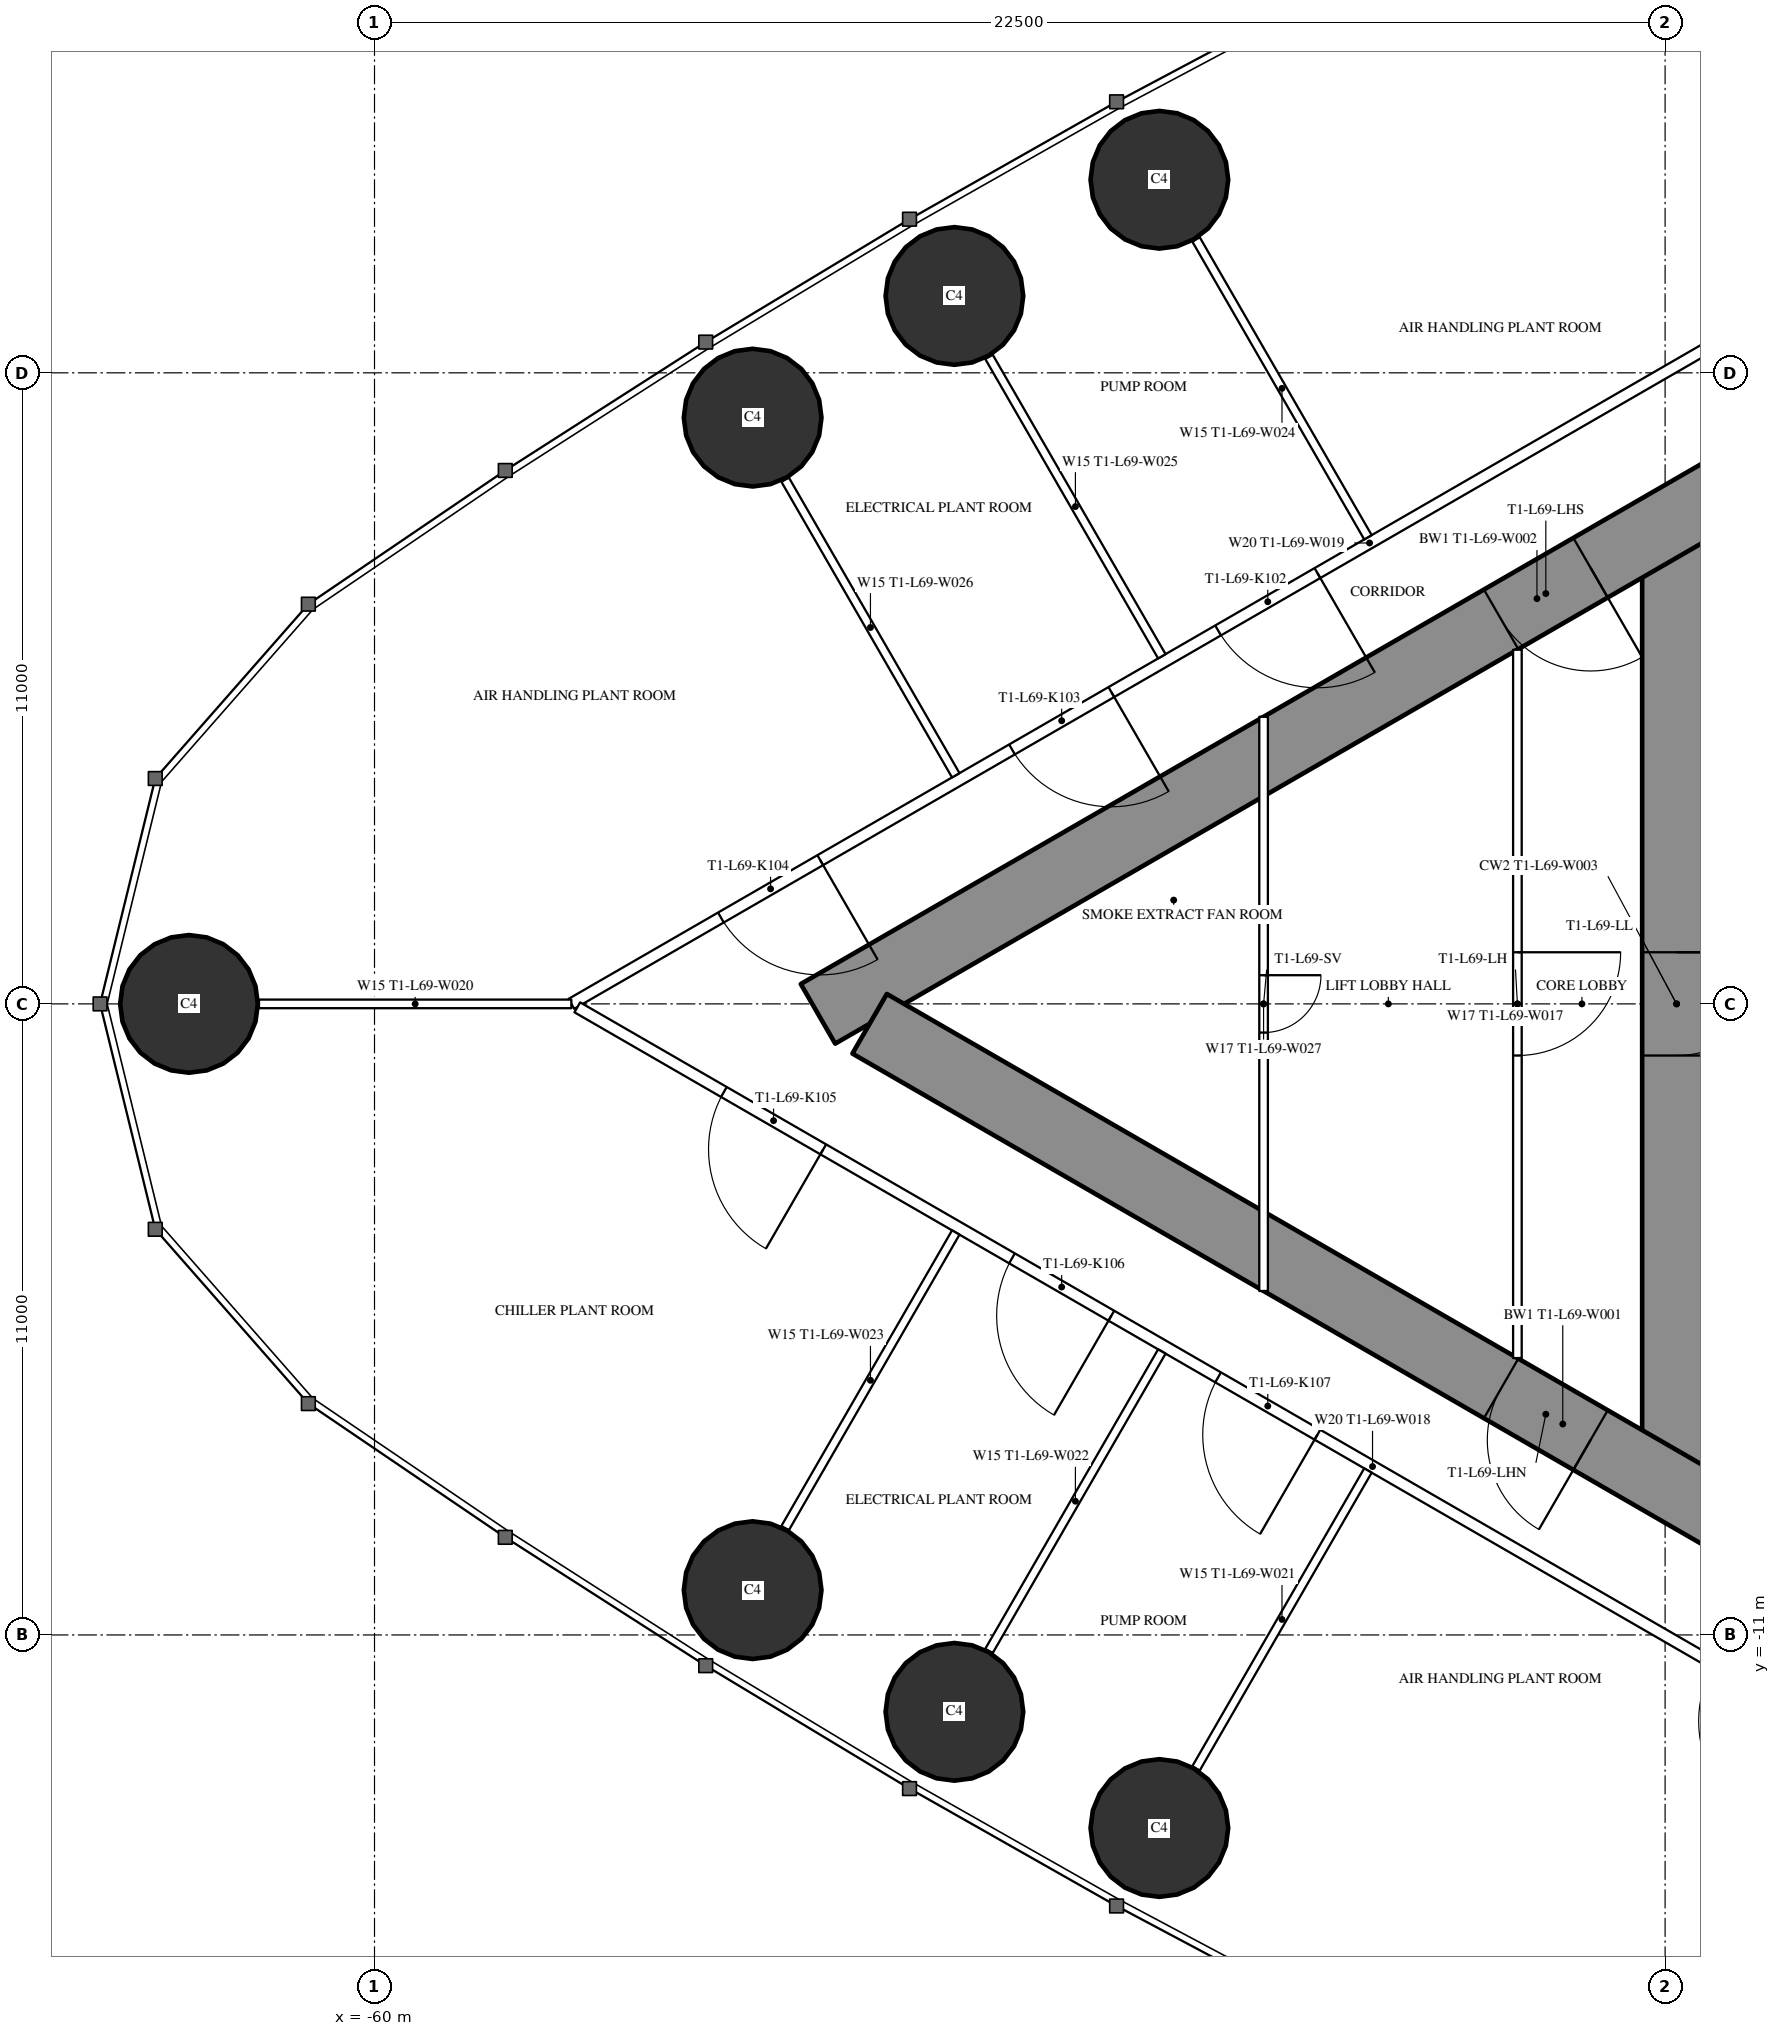
"""IFC4 building model, lengths in metres.
Left out: names, types, materials, properties, quantities, classifications, styles, units other than length and angle.
Written with IfcOpenShell. Run it as: python <this file> out.ifc"""

import sys

from ifc_helpers import new_model, si_unit, direction, frame, frame_2d, origin, origin_2d, place, context, subcontext, project, spatial, rectangle, circle, extrude, element, fill, save


model = new_model("IFC4")
c1 = context("Model", 3, precision=1e-05, world=origin(), true_north=direction((0.0, 1.0)))
c2 = subcontext(c1, "Body", "Model", "MODEL_VIEW")
j1 = project(units=[si_unit("LENGTHUNIT", "METRE"), si_unit("PLANEANGLEUNIT", "RADIAN")], contexts=[c1])
p1 = place(None, origin())
s1 = spatial("IfcSite", under=j1, at=p1, CompositionType="ELEMENT")
p2 = place(p1, origin())
s2 = spatial("IfcBuilding", under=s1, at=p2, CompositionType="ELEMENT")
p3 = place(p2, frame((0.0, 0.0, 263.3)))
s3 = spatial("IfcBuildingStorey", under=s2, at=p3, CompositionType="ELEMENT", Elevation=263.3)
for number, where, z_axis, x_axis in (
    (1, (-63.234, 0.0, 0.0), (0.0, 0.0, 1.0), (1.0, 0.0, 0.0)),
    (2, (-53.408, -10.219, 0.0), (0.0, 0.0, 1.0), (1.0, 0.0, 0.0)),
    (3, (-49.89, -12.34, 0.0), (0.0, 0.0, 1.0), (1.0, 0.0, 0.0)),
    (4, (-46.317, -14.365, 0.0), (0.0, 0.0, 1.0), (1.0, 0.0, 0.0)),
    (5, (-46.317, 14.365, 0.0), (0.0, 0.0, 1.0), (1.0, 0.0, 0.0)),
    (6, (-49.89, 12.34, 0.0), (0.0, 0.0, 1.0), (1.0, 0.0, 0.0)),
    (7, (-53.408, 10.219, 0.0), (0.0, 0.0, 1.0), (1.0, 0.0, 0.0)),
):
    element("IfcColumn", number, at=place(p3, frame(where, z_axis=z_axis, x_axis=x_axis)), inside=s3, PredefinedType="COLUMN", context=c2, shape_type="SweptSolid", body=[
        extrude(circle(Radius=1.2, at=origin_2d()), origin(), (0.0, 0.0, 1.0), 5.0),
    ])
p4 = place(p3, frame((-37.3, 8.6, 0.0), z_axis=(0.0, 0.0, 1.0), x_axis=(0.0, -1.0, 0.0)))
e8 = element("IfcWall", 8, at=p4, inside=s3, PredefinedType="SHEAR", context=c2, shape_type="SweptSolid", body=[
    extrude(rectangle(XDim=17.2, YDim=1.2, at=frame_2d((8.6, 0.0))), origin(), (0.0, 0.0, 1.0), 5.0),
])
p5 = place(p4, frame((7.7, 0.0, 0.0)))
e9 = element("IfcOpeningElement", 9, at=p5, cuts=e8, PredefinedType="OPENING", context=c2, shape_type="SweptSolid", body=[
    extrude(rectangle(XDim=1.8, YDim=2.2, at=frame_2d((0.9, 1.1))), frame((0.0, 0.61, 0.0), z_axis=(0.0, -1.0, 0.0), x_axis=(1.0, 0.0, 0.0)), (0.0, 0.0, 1.0), 1.22),
])
p6 = place(p3, frame((-27.2, 14.3, 0.0), z_axis=(0.0, 0.0, 1.0), x_axis=(-0.866026593062, -0.499997940104, 0.0)))
e10 = element("IfcWall", 10, at=p6, inside=s3, PredefinedType="SHEAR", context=c2, shape_type="SweptSolid", body=[
    extrude(rectangle(XDim=28.946, YDim=1.2, at=frame_2d((14.473, 0.0))), origin(), (0.0, 0.0, 1.0), 5.0),
])
p7 = place(p6, frame((4.6, 0.0, 0.0)))
e11 = element("IfcOpeningElement", 11, at=p7, cuts=e10, PredefinedType="OPENING", context=c2, shape_type="SweptSolid", body=[
    extrude(rectangle(XDim=1.0, YDim=2.2, at=frame_2d((0.5, 1.1))), frame((0.0, 0.61, 0.0), z_axis=(0.0, -1.0, 0.0), x_axis=(1.0, 0.0, 0.0)), (0.0, 0.0, 1.0), 1.22),
])
p8 = place(p6, frame((13.395, 0.0, 0.0)))
e12 = element("IfcOpeningElement", 12, at=p8, cuts=e10, PredefinedType="OPENING", context=c2, shape_type="SweptSolid", body=[
    extrude(rectangle(XDim=1.8, YDim=2.2, at=frame_2d((0.9, 1.1))), frame((0.0, 0.61, 0.0), z_axis=(0.0, -1.0, 0.0), x_axis=(1.0, 0.0, 0.0)), (0.0, 0.0, 1.0), 1.22),
])
p9 = place(p3, frame((-27.2, -14.3, 0.0), z_axis=(0.0, 0.0, 1.0), x_axis=(-0.866024021859, 0.500002393557, 0.0)))
e13 = element("IfcWall", 13, at=p9, inside=s3, PredefinedType="SHEAR", context=c2, shape_type="SweptSolid", body=[
    extrude(rectangle(XDim=27.907, YDim=1.2, at=frame_2d((13.954, 0.0))), origin(), (0.0, 0.0, 1.0), 5.0),
])
p10 = place(p9, frame((4.6, 0.0, 0.0)))
e14 = element("IfcOpeningElement", 14, at=p10, cuts=e13, PredefinedType="OPENING", context=c2, shape_type="SweptSolid", body=[
    extrude(rectangle(XDim=1.0, YDim=2.2, at=frame_2d((0.5, 1.1))), frame((0.0, 0.61, 0.0), z_axis=(0.0, -1.0, 0.0), x_axis=(1.0, 0.0, 0.0)), (0.0, 0.0, 1.0), 1.22),
])
p11 = place(p9, frame((13.395, 0.0, 0.0)))
e15 = element("IfcOpeningElement", 15, at=p11, cuts=e13, PredefinedType="OPENING", context=c2, shape_type="SweptSolid", body=[
    extrude(rectangle(XDim=1.8, YDim=2.2, at=frame_2d((0.9, 1.1))), frame((0.0, 0.61, 0.0), z_axis=(0.0, -1.0, 0.0), x_axis=(1.0, 0.0, 0.0)), (0.0, 0.0, 1.0), 1.22),
])
p12 = place(p3, frame((-28.737, 16.068, 0.0), z_axis=(0.0, 0.0, 1.0), x_axis=(-0.866026057212, -0.499998868229, 0.0)))
e16 = element("IfcWall", 16, at=p12, inside=s3, PredefinedType="PARTITIONING", context=c2, shape_type="SweptSolid", body=[
    extrude(rectangle(XDim=32.137, YDim=0.2, at=frame_2d((16.068, 0.0))), origin(), (0.0, 0.0, 1.0), 4.75),
])
p13 = place(p12, frame((7.134, 0.0, 0.0)))
e17 = element("IfcOpeningElement", 17, at=p13, cuts=e16, PredefinedType="OPENING", context=c2, shape_type="SweptSolid", body=[
    extrude(rectangle(XDim=2.0, YDim=2.4, at=frame_2d((1.0, 1.2))), frame((0.0, 0.11, 0.0), z_axis=(0.0, -1.0, 0.0), x_axis=(1.0, 0.0, 0.0)), (0.0, 0.0, 1.0), 0.22),
])
p14 = place(p12, frame((17.117, 0.0, 0.0)))
e18 = element("IfcOpeningElement", 18, at=p14, cuts=e16, PredefinedType="OPENING", context=c2, shape_type="SweptSolid", body=[
    extrude(rectangle(XDim=2.0, YDim=2.4, at=frame_2d((1.0, 1.2))), frame((0.0, 0.11, 0.0), z_axis=(0.0, -1.0, 0.0), x_axis=(1.0, 0.0, 0.0)), (0.0, 0.0, 1.0), 0.22),
])
p15 = place(p12, frame((21.266, 0.0, 0.0)))
e19 = element("IfcOpeningElement", 19, at=p15, cuts=e16, PredefinedType="OPENING", context=c2, shape_type="SweptSolid", body=[
    extrude(rectangle(XDim=2.0, YDim=2.4, at=frame_2d((1.0, 1.2))), frame((0.0, 0.11, 0.0), z_axis=(0.0, -1.0, 0.0), x_axis=(1.0, 0.0, 0.0)), (0.0, 0.0, 1.0), 0.22),
])
p16 = place(p12, frame((27.126, 0.0, 0.0)))
e20 = element("IfcOpeningElement", 20, at=p16, cuts=e16, PredefinedType="OPENING", context=c2, shape_type="SweptSolid", body=[
    extrude(rectangle(XDim=2.0, YDim=2.4, at=frame_2d((1.0, 1.2))), frame((0.0, 0.11, 0.0), z_axis=(0.0, -1.0, 0.0), x_axis=(1.0, 0.0, 0.0)), (0.0, 0.0, 1.0), 0.22),
])
p17 = place(p3, frame((-28.737, -16.068, 0.0), z_axis=(0.0, 0.0, 1.0), x_axis=(-0.866026220747, 0.499998584977, 0.0)))
e21 = element("IfcWall", 21, at=p17, inside=s3, PredefinedType="PARTITIONING", context=c2, shape_type="SweptSolid", body=[
    extrude(rectangle(XDim=32.017, YDim=0.2, at=frame_2d((16.008, 0.0))), origin(), (0.0, 0.0, 1.0), 4.75),
])
p18 = place(p17, frame((27.066, 0.0, 0.0)))
e22 = element("IfcOpeningElement", 22, at=p18, cuts=e21, PredefinedType="OPENING", context=c2, shape_type="SweptSolid", body=[
    extrude(rectangle(XDim=2.0, YDim=2.4, at=frame_2d((1.0, 1.2))), frame((0.0, 0.11, 0.0), z_axis=(0.0, -1.0, 0.0), x_axis=(1.0, 0.0, 0.0)), (0.0, 0.0, 1.0), 0.22),
])
p19 = place(p17, frame((21.266, 0.0, 0.0)))
e23 = element("IfcOpeningElement", 23, at=p19, cuts=e21, PredefinedType="OPENING", context=c2, shape_type="SweptSolid", body=[
    extrude(rectangle(XDim=2.0, YDim=2.4, at=frame_2d((1.0, 1.2))), frame((0.0, 0.11, 0.0), z_axis=(0.0, -1.0, 0.0), x_axis=(1.0, 0.0, 0.0)), (0.0, 0.0, 1.0), 0.22),
])
p20 = place(p17, frame((17.117, 0.0, 0.0)))
e24 = element("IfcOpeningElement", 24, at=p20, cuts=e21, PredefinedType="OPENING", context=c2, shape_type="SweptSolid", body=[
    extrude(rectangle(XDim=2.0, YDim=2.4, at=frame_2d((1.0, 1.2))), frame((0.0, 0.11, 0.0), z_axis=(0.0, -1.0, 0.0), x_axis=(1.0, 0.0, 0.0)), (0.0, 0.0, 1.0), 0.22),
])
p21 = place(p17, frame((7.134, 0.0, 0.0)))
e25 = element("IfcOpeningElement", 25, at=p21, cuts=e21, PredefinedType="OPENING", context=c2, shape_type="SweptSolid", body=[
    extrude(rectangle(XDim=2.0, YDim=2.4, at=frame_2d((1.0, 1.2))), frame((0.0, 0.11, 0.0), z_axis=(0.0, -1.0, 0.0), x_axis=(1.0, 0.0, 0.0)), (0.0, 0.0, 1.0), 0.22),
])
p22 = place(p3, frame((-42.68, 8.134, 0.0), z_axis=(0.0, 0.0, 1.0), x_axis=(-0.499984479505, 0.866034364361, 0.0)))
e26 = element("IfcWall", 26, at=p22, inside=s3, PredefinedType="PARTITIONING", context=c2, shape_type="SweptSolid", body=[
    extrude(rectangle(XDim=5.995, YDim=0.15, at=frame_2d((2.998, 0.0))), origin(), (0.0, 0.0, 1.0), 3.85),
])
p23 = place(p3, frame((-46.274, 6.059, 0.0), z_axis=(0.0, 0.0, 1.0), x_axis=(-0.500020471368, 0.866013584312, 0.0)))
e27 = element("IfcWall", 27, at=p23, inside=s3, PredefinedType="PARTITIONING", context=c2, shape_type="SweptSolid", body=[
    extrude(rectangle(XDim=6.028, YDim=0.15, at=frame_2d((3.014, 0.0))), origin(), (0.0, 0.0, 1.0), 3.85),
])
p24 = place(p3, frame((-49.866, 3.985, 0.0), z_axis=(0.0, 0.0, 1.0), x_axis=(-0.500000694566, 0.866025002776, 0.0)))
e28 = element("IfcWall", 28, at=p24, inside=s3, PredefinedType="PARTITIONING", context=c2, shape_type="SweptSolid", body=[
    extrude(rectangle(XDim=5.95, YDim=0.15, at=frame_2d((2.975, 0.0))), origin(), (0.0, 0.0, 1.0), 3.85),
])
p25 = place(p3, frame((-42.68, -8.134, 0.0), z_axis=(0.0, 0.0, 1.0), x_axis=(-0.499984479505, -0.866034364361, 0.0)))
e29 = element("IfcWall", 29, at=p25, inside=s3, PredefinedType="PARTITIONING", context=c2, shape_type="SweptSolid", body=[
    extrude(rectangle(XDim=5.995, YDim=0.15, at=frame_2d((2.998, 0.0))), origin(), (0.0, 0.0, 1.0), 3.85),
])
p26 = place(p3, frame((-46.274, -6.059, 0.0), z_axis=(0.0, 0.0, 1.0), x_axis=(-0.500020471368, -0.866013584312, 0.0)))
e30 = element("IfcWall", 30, at=p26, inside=s3, PredefinedType="PARTITIONING", context=c2, shape_type="SweptSolid", body=[
    extrude(rectangle(XDim=6.028, YDim=0.15, at=frame_2d((3.014, 0.0))), origin(), (0.0, 0.0, 1.0), 3.85),
])
p27 = place(p3, frame((-49.866, -3.985, 0.0), z_axis=(0.0, 0.0, 1.0), x_axis=(-0.500000694566, -0.866025002776, 0.0)))
e31 = element("IfcWall", 31, at=p27, inside=s3, PredefinedType="PARTITIONING", context=c2, shape_type="SweptSolid", body=[
    extrude(rectangle(XDim=5.95, YDim=0.15, at=frame_2d((2.975, 0.0))), origin(), (0.0, 0.0, 1.0), 3.85),
])
p28 = place(p3, frame((-56.568, 0.0, 0.0), z_axis=(0.0, 0.0, 1.0), x_axis=(-1.0, 0.0, 0.0)))
e32 = element("IfcWall", 32, at=p28, inside=s3, PredefinedType="PARTITIONING", context=c2, shape_type="SweptSolid", body=[
    extrude(rectangle(XDim=5.446, YDim=0.15, at=frame_2d((2.723, 0.0))), origin(), (0.0, 0.0, 1.0), 3.85),
])
p29 = place(p3, frame((-40.075, 6.174, 0.0), z_axis=(0.0, 0.0, 1.0), x_axis=(0.0, -1.0, 0.0)))
e33 = element("IfcWall", 33, at=p29, inside=s3, PredefinedType="PARTITIONING", context=c2, shape_type="SweptSolid", body=[
    extrude(rectangle(XDim=12.348, YDim=0.15, at=frame_2d((6.174, 0.0))), origin(), (0.0, 0.0, 1.0), 4.75),
])
p30 = place(p29, frame((5.274, 0.0, 0.0)))
e34 = element("IfcOpeningElement", 34, at=p30, cuts=e33, PredefinedType="OPENING", context=c2, shape_type="SweptSolid", body=[
    extrude(rectangle(XDim=1.8, YDim=2.2, at=frame_2d((0.9, 1.1))), frame((0.0, 0.085, 0.0), z_axis=(0.0, -1.0, 0.0), x_axis=(1.0, 0.0, 0.0)), (0.0, 0.0, 1.0), 0.17),
])
p31 = place(p3, frame((-44.5, 5.005, 0.0), z_axis=(0.0, 0.0, 1.0), x_axis=(0.0, -1.0, 0.0)))
e35 = element("IfcWall", 35, at=p31, inside=s3, PredefinedType="PARTITIONING", context=c2, shape_type="SweptSolid", body=[
    extrude(rectangle(XDim=10.009, YDim=0.15, at=frame_2d((5.005, 0.0))), origin(), (0.0, 0.0, 1.0), 3.9),
])
p32 = place(p31, frame((4.505, 0.0, 0.0)))
e36 = element("IfcOpeningElement", 36, at=p32, cuts=e35, PredefinedType="OPENING", context=c2, shape_type="SweptSolid", body=[
    extrude(rectangle(XDim=1.0, YDim=2.2, at=frame_2d((0.5, 1.1))), frame((0.0, 0.085, 0.0), z_axis=(0.0, -1.0, 0.0), x_axis=(1.0, 0.0, 0.0)), (0.0, 0.0, 1.0), 0.17),
])
p33 = place(p14, origin())
e37 = element("IfcDoor", 37, at=p33, inside=s3, OperationType="DOUBLE_DOOR_SINGLE_SWING", PredefinedType="DOOR", context=c2, shape_type="SweptSolid", body=[
    extrude(rectangle(XDim=2.0, YDim=2.4, at=frame_2d((1.0, 1.2))), frame((0.0, 0.025, 0.0), z_axis=(0.0, -1.0, 0.0), x_axis=(1.0, 0.0, 0.0)), (0.0, 0.0, 1.0), 0.05),
])
fill(e18, e37)
p34 = place(p15, origin())
e38 = element("IfcDoor", 38, at=p34, inside=s3, OperationType="DOUBLE_DOOR_SINGLE_SWING", PredefinedType="DOOR", context=c2, shape_type="SweptSolid", body=[
    extrude(rectangle(XDim=2.0, YDim=2.4, at=frame_2d((1.0, 1.2))), frame((0.0, 0.025, 0.0), z_axis=(0.0, -1.0, 0.0), x_axis=(1.0, 0.0, 0.0)), (0.0, 0.0, 1.0), 0.05),
])
fill(e19, e38)
p35 = place(p16, origin())
e39 = element("IfcDoor", 39, at=p35, inside=s3, OperationType="DOUBLE_DOOR_SINGLE_SWING", PredefinedType="DOOR", context=c2, shape_type="SweptSolid", body=[
    extrude(rectangle(XDim=2.0, YDim=2.4, at=frame_2d((1.0, 1.2))), frame((0.0, 0.025, 0.0), z_axis=(0.0, -1.0, 0.0), x_axis=(1.0, 0.0, 0.0)), (0.0, 0.0, 1.0), 0.05),
])
fill(e20, e39)
p36 = place(p18, origin())
e40 = element("IfcDoor", 40, at=p36, inside=s3, OperationType="DOUBLE_DOOR_SINGLE_SWING", PredefinedType="DOOR", context=c2, shape_type="SweptSolid", body=[
    extrude(rectangle(XDim=2.0, YDim=2.4, at=frame_2d((1.0, 1.2))), frame((0.0, 0.025, 0.0), z_axis=(0.0, -1.0, 0.0), x_axis=(1.0, 0.0, 0.0)), (0.0, 0.0, 1.0), 0.05),
])
fill(e22, e40)
p37 = place(p19, origin())
e41 = element("IfcDoor", 41, at=p37, inside=s3, OperationType="DOUBLE_DOOR_SINGLE_SWING", PredefinedType="DOOR", context=c2, shape_type="SweptSolid", body=[
    extrude(rectangle(XDim=2.0, YDim=2.4, at=frame_2d((1.0, 1.2))), frame((0.0, 0.025, 0.0), z_axis=(0.0, -1.0, 0.0), x_axis=(1.0, 0.0, 0.0)), (0.0, 0.0, 1.0), 0.05),
])
fill(e23, e41)
p38 = place(p20, origin())
e42 = element("IfcDoor", 42, at=p38, inside=s3, OperationType="DOUBLE_DOOR_SINGLE_SWING", PredefinedType="DOOR", context=c2, shape_type="SweptSolid", body=[
    extrude(rectangle(XDim=2.0, YDim=2.4, at=frame_2d((1.0, 1.2))), frame((0.0, 0.025, 0.0), z_axis=(0.0, -1.0, 0.0), x_axis=(1.0, 0.0, 0.0)), (0.0, 0.0, 1.0), 0.05),
])
fill(e24, e42)
p39 = place(p30, origin())
e43 = element("IfcDoor", 43, at=p39, inside=s3, OperationType="DOUBLE_DOOR_SINGLE_SWING", PredefinedType="DOOR", context=c2, shape_type="SweptSolid", body=[
    extrude(rectangle(XDim=1.8, YDim=2.2, at=frame_2d((0.9, 1.1))), frame((0.0, 0.025, 0.0), z_axis=(0.0, -1.0, 0.0), x_axis=(1.0, 0.0, 0.0)), (0.0, 0.0, 1.0), 0.05),
])
fill(e34, e43)
p40 = place(p32, origin())
e44 = element("IfcDoor", 44, at=p40, inside=s3, OperationType="SINGLE_SWING_LEFT", PredefinedType="DOOR", context=c2, shape_type="SweptSolid", body=[
    extrude(rectangle(XDim=1.0, YDim=2.2, at=frame_2d((0.5, 1.1))), frame((0.0, 0.025, 0.0), z_axis=(0.0, -1.0, 0.0), x_axis=(1.0, 0.0, 0.0)), (0.0, 0.0, 1.0), 0.05),
])
fill(e36, e44)
p41 = place(p8, origin())
e45 = element("IfcDoor", 45, at=p41, inside=s3, OperationType="DOUBLE_DOOR_SINGLE_SWING", PredefinedType="DOOR", context=c2, shape_type="SweptSolid", body=[
    extrude(rectangle(XDim=1.8, YDim=2.2, at=frame_2d((0.9, 1.1))), frame((0.0, 0.025, 0.0), z_axis=(0.0, -1.0, 0.0), x_axis=(1.0, 0.0, 0.0)), (0.0, 0.0, 1.0), 0.05),
])
fill(e12, e45)
p42 = place(p11, origin())
e46 = element("IfcDoor", 46, at=p42, inside=s3, OperationType="DOUBLE_DOOR_SINGLE_SWING", PredefinedType="DOOR", context=c2, shape_type="SweptSolid", body=[
    extrude(rectangle(XDim=1.8, YDim=2.2, at=frame_2d((0.9, 1.1))), frame((0.0, 0.025, 0.0), z_axis=(0.0, -1.0, 0.0), x_axis=(1.0, 0.0, 0.0)), (0.0, 0.0, 1.0), 0.05),
])
fill(e15, e46)
p43 = place(p5, origin())
e47 = element("IfcDoor", 47, at=p43, inside=s3, OperationType="DOUBLE_DOOR_SINGLE_SWING", PredefinedType="DOOR", context=c2, shape_type="SweptSolid", body=[
    extrude(rectangle(XDim=1.8, YDim=2.2, at=frame_2d((0.9, 1.1))), frame((0.0, 0.025, 0.0), z_axis=(0.0, -1.0, 0.0), x_axis=(1.0, 0.0, 0.0)), (0.0, 0.0, 1.0), 0.05),
])
fill(e9, e47)
save(model, sys.argv[1])
